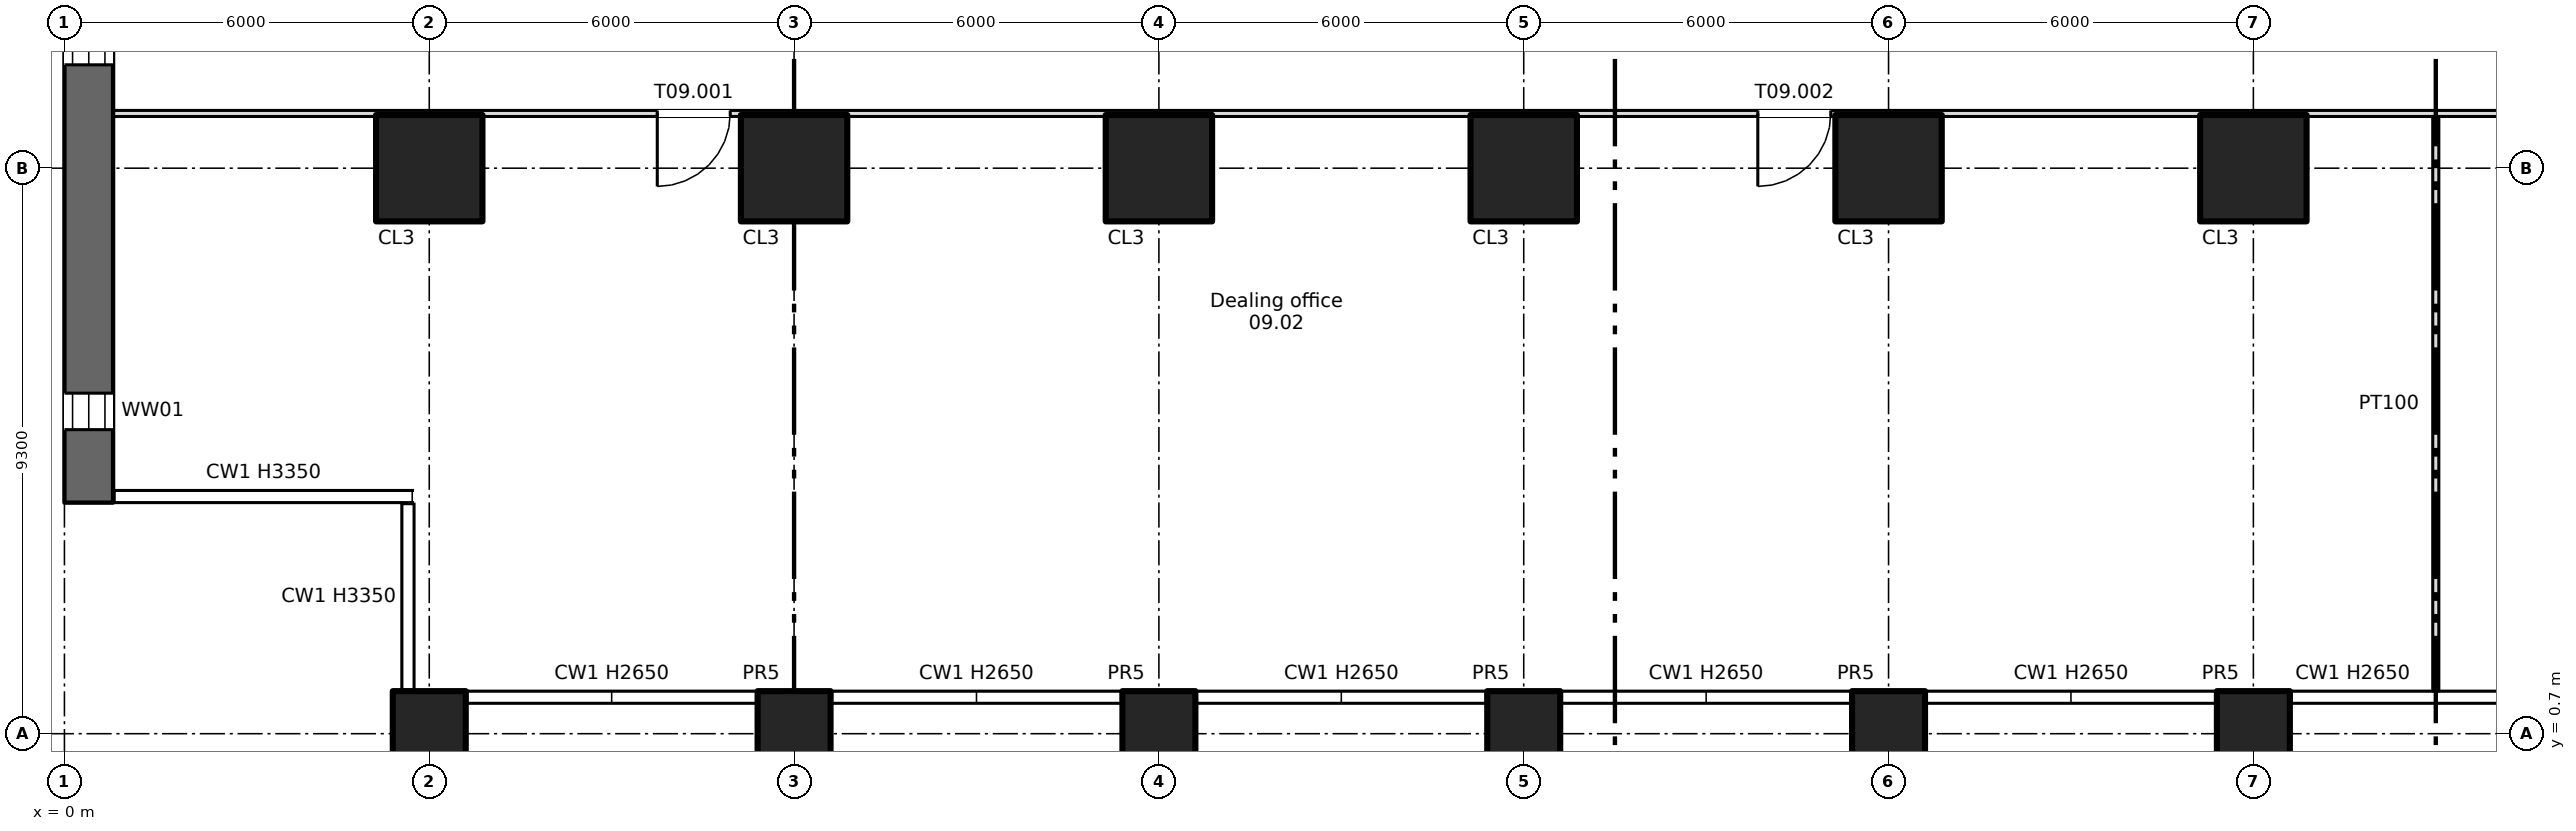
"""IFC4 building model, lengths in metres.
Left out: names, types, materials, properties, quantities, classifications, styles, units other than length and angle.
Written with IfcOpenShell. Run it as: python <this file> out.ifc"""

import sys

from ifc_helpers import new_model, si_unit, direction, frame, frame_2d, origin, origin_2d, place, context, subcontext, project, spatial, rectangle, extrude, element, fill, save


model = new_model("IFC4")
c1 = context("Model", 3, precision=1e-05, world=origin(), true_north=direction((0.0, 1.0)))
c2 = subcontext(c1, "Body", "Model", "MODEL_VIEW")
j1 = project(units=[si_unit("LENGTHUNIT", "METRE"), si_unit("PLANEANGLEUNIT", "RADIAN")], contexts=[c1])
p1 = place(None, origin())
s1 = spatial("IfcSite", under=j1, at=p1, CompositionType="ELEMENT")
p2 = place(p1, origin())
s2 = spatial("IfcBuilding", under=s1, at=p2, CompositionType="ELEMENT")
p3 = place(p2, frame((0.0, 0.0, 37.5)))
s3 = spatial("IfcBuildingStorey", under=s2, at=p3, CompositionType="ELEMENT", Elevation=37.5)
for number, where, z_axis, x_axis in (
    (1, (6.0, 0.7, -0.4), (0.0, 0.0, 1.0), (1.0, 0.0, 0.0)),
    (2, (12.0, 0.7, -0.4), (0.0, 0.0, 1.0), (1.0, 0.0, 0.0)),
    (3, (18.0, 0.7, -0.4), (0.0, 0.0, 1.0), (1.0, 0.0, 0.0)),
    (4, (24.0, 0.7, -0.4), (0.0, 0.0, 1.0), (1.0, 0.0, 0.0)),
    (5, (30.0, 0.7, -0.4), (0.0, 0.0, 1.0), (1.0, 0.0, 0.0)),
    (6, (36.0, 0.7, -0.4), (0.0, 0.0, 1.0), (1.0, 0.0, 0.0)),
):
    element("IfcColumn", number, at=place(p3, frame(where, z_axis=z_axis, x_axis=x_axis)), inside=s3, PredefinedType="COLUMN", context=c2, shape_type="SweptSolid", body=[
        extrude(rectangle(XDim=1.2, YDim=1.4, at=origin_2d()), origin(), (0.0, 0.0, 1.0), 3.75),
    ])
for number, where, z_axis, x_axis in (
    (7, (6.0, 10.0, 0.0), (0.0, 0.0, 1.0), (1.0, 0.0, 0.0)),
    (8, (12.0, 10.0, 0.0), (0.0, 0.0, 1.0), (1.0, 0.0, 0.0)),
    (9, (18.0, 10.0, 0.0), (0.0, 0.0, 1.0), (1.0, 0.0, 0.0)),
    (10, (24.0, 10.0, 0.0), (0.0, 0.0, 1.0), (1.0, 0.0, 0.0)),
    (11, (30.0, 10.0, 0.0), (0.0, 0.0, 1.0), (1.0, 0.0, 0.0)),
    (12, (36.0, 10.0, 0.0), (0.0, 0.0, 1.0), (1.0, 0.0, 0.0)),
):
    element("IfcColumn", number, at=place(p3, frame(where, z_axis=z_axis, x_axis=x_axis)), inside=s3, PredefinedType="COLUMN", context=c2, shape_type="SweptSolid", body=[
        extrude(rectangle(XDim=1.75, YDim=1.75, at=origin_2d()), origin(), (0.0, 0.0, 1.0), 3.35),
    ])
p4 = place(p3, frame((0.4, 4.5, 0.0), z_axis=(0.0, 0.0, 1.0), x_axis=(0.0, 1.0, 0.0)))
e13 = element("IfcWall", 13, at=p4, inside=s3, PredefinedType="SHEAR", context=c2, shape_type="SweptSolid", body=[
    extrude(rectangle(XDim=37.0, YDim=0.8, at=frame_2d((18.5, 0.0))), origin(), (0.0, 0.0, 1.0), 3.35),
])
p5 = place(p4, frame((1.2, 0.0, 0.6)))
e14 = element("IfcOpeningElement", 14, at=p5, cuts=e13, PredefinedType="OPENING", context=c2, shape_type="SweptSolid", body=[
    extrude(rectangle(XDim=0.6, YDim=2.4, at=frame_2d((0.3, 1.2))), frame((0.0, 0.41, 0.0), z_axis=(0.0, -1.0, 0.0), x_axis=(1.0, 0.0, 0.0)), (0.0, 0.0, 1.0), 0.82),
])
p6 = place(p4, frame((7.2, 0.0, 0.6)))
e15 = element("IfcOpeningElement", 15, at=p6, cuts=e13, PredefinedType="OPENING", context=c2, shape_type="SweptSolid", body=[
    extrude(rectangle(XDim=0.6, YDim=2.4, at=frame_2d((0.3, 1.2))), frame((0.0, 0.41, 0.0), z_axis=(0.0, -1.0, 0.0), x_axis=(1.0, 0.0, 0.0)), (0.0, 0.0, 1.0), 0.82),
])
p7 = place(p4, frame((13.2, 0.0, 0.6)))
e16 = element("IfcOpeningElement", 16, at=p7, cuts=e13, PredefinedType="OPENING", context=c2, shape_type="SweptSolid", body=[
    extrude(rectangle(XDim=0.6, YDim=2.4, at=frame_2d((0.3, 1.2))), frame((0.0, 0.41, 0.0), z_axis=(0.0, -1.0, 0.0), x_axis=(1.0, 0.0, 0.0)), (0.0, 0.0, 1.0), 0.82),
])
p8 = place(p4, frame((19.2, 0.0, 0.6)))
e17 = element("IfcOpeningElement", 17, at=p8, cuts=e13, PredefinedType="OPENING", context=c2, shape_type="SweptSolid", body=[
    extrude(rectangle(XDim=0.6, YDim=2.4, at=frame_2d((0.3, 1.2))), frame((0.0, 0.41, 0.0), z_axis=(0.0, -1.0, 0.0), x_axis=(1.0, 0.0, 0.0)), (0.0, 0.0, 1.0), 0.82),
])
p9 = place(p4, frame((25.2, 0.0, 0.6)))
e18 = element("IfcOpeningElement", 18, at=p9, cuts=e13, PredefinedType="OPENING", context=c2, shape_type="SweptSolid", body=[
    extrude(rectangle(XDim=0.6, YDim=2.4, at=frame_2d((0.3, 1.2))), frame((0.0, 0.41, 0.0), z_axis=(0.0, -1.0, 0.0), x_axis=(1.0, 0.0, 0.0)), (0.0, 0.0, 1.0), 0.82),
])
p10 = place(p4, frame((31.2, 0.0, 0.6)))
e19 = element("IfcOpeningElement", 19, at=p10, cuts=e13, PredefinedType="OPENING", context=c2, shape_type="SweptSolid", body=[
    extrude(rectangle(XDim=0.6, YDim=2.4, at=frame_2d((0.3, 1.2))), frame((0.0, 0.41, 0.0), z_axis=(0.0, -1.0, 0.0), x_axis=(1.0, 0.0, 0.0)), (0.0, 0.0, 1.0), 0.82),
])
p11 = place(p3, frame((0.8, 10.9, 0.0), z_axis=(0.0, 0.0, 1.0), x_axis=(1.0, 0.0, 0.0)))
e20 = element("IfcWall", 20, at=p11, inside=s3, PredefinedType="PARTITIONING", context=c2, shape_type="SweptSolid", body=[
    extrude(rectangle(XDim=76.4, YDim=0.1, at=frame_2d((38.2, 0.0))), origin(), (0.0, 0.0, 1.0), 3.35),
])
p12 = place(p11, frame((8.95, 0.0, 0.0)))
e21 = element("IfcOpeningElement", 21, at=p12, cuts=e20, PredefinedType="OPENING", context=c2, shape_type="SweptSolid", body=[
    extrude(rectangle(XDim=1.2, YDim=2.1, at=frame_2d((0.6, 1.05))), frame((0.0, 0.06, 0.0), z_axis=(0.0, -1.0, 0.0), x_axis=(1.0, 0.0, 0.0)), (0.0, 0.0, 1.0), 0.12),
])
p13 = place(p11, frame((27.05, 0.0, 0.0)))
e22 = element("IfcOpeningElement", 22, at=p13, cuts=e20, PredefinedType="OPENING", context=c2, shape_type="SweptSolid", body=[
    extrude(rectangle(XDim=1.2, YDim=2.1, at=frame_2d((0.6, 1.05))), frame((0.0, 0.06, 0.0), z_axis=(0.0, -1.0, 0.0), x_axis=(1.0, 0.0, 0.0)), (0.0, 0.0, 1.0), 0.12),
])
p14 = place(p11, frame((48.15, 0.0, 0.0)))
e23 = element("IfcOpeningElement", 23, at=p14, cuts=e20, PredefinedType="OPENING", context=c2, shape_type="SweptSolid", body=[
    extrude(rectangle(XDim=1.2, YDim=2.1, at=frame_2d((0.6, 1.05))), frame((0.0, 0.06, 0.0), z_axis=(0.0, -1.0, 0.0), x_axis=(1.0, 0.0, 0.0)), (0.0, 0.0, 1.0), 0.12),
])
p15 = place(p11, frame((66.25, 0.0, 0.0)))
e24 = element("IfcOpeningElement", 24, at=p15, cuts=e20, PredefinedType="OPENING", context=c2, shape_type="SweptSolid", body=[
    extrude(rectangle(XDim=1.2, YDim=2.1, at=frame_2d((0.6, 1.05))), frame((0.0, 0.06, 0.0), z_axis=(0.0, -1.0, 0.0), x_axis=(1.0, 0.0, 0.0)), (0.0, 0.0, 1.0), 0.12),
])
p16 = place(p3, frame((39.0, 1.4, 0.0), z_axis=(0.0, 0.0, 1.0), x_axis=(0.0, 1.0, 0.0)))
e25 = element("IfcWall", 25, at=p16, inside=s3, PredefinedType="PARTITIONING", context=c2, shape_type="SweptSolid", body=[
    extrude(rectangle(XDim=9.45, YDim=0.1, at=frame_2d((4.725, 0.0))), origin(), (0.0, 0.0, 1.0), 3.35),
])
p17 = place(p5, origin())
e26 = element("IfcWindow", 26, at=p17, inside=s3, PartitioningType="SINGLE_PANEL", PredefinedType="WINDOW", context=c2, shape_type="SweptSolid", body=[
    extrude(rectangle(XDim=0.6, YDim=2.4, at=frame_2d((0.3, 1.2))), frame((0.0, 0.03, 0.0), z_axis=(0.0, -1.0, 0.0), x_axis=(1.0, 0.0, 0.0)), (0.0, 0.0, 1.0), 0.06),
])
fill(e14, e26)
p18 = place(p6, origin())
e27 = element("IfcWindow", 27, at=p18, inside=s3, PartitioningType="SINGLE_PANEL", PredefinedType="WINDOW", context=c2, shape_type="SweptSolid", body=[
    extrude(rectangle(XDim=0.6, YDim=2.4, at=frame_2d((0.3, 1.2))), frame((0.0, 0.03, 0.0), z_axis=(0.0, -1.0, 0.0), x_axis=(1.0, 0.0, 0.0)), (0.0, 0.0, 1.0), 0.06),
])
fill(e15, e27)
p19 = place(p12, origin())
e28 = element("IfcDoor", 28, at=p19, inside=s3, OperationType="SINGLE_SWING_LEFT", PredefinedType="DOOR", context=c2, shape_type="SweptSolid", body=[
    extrude(rectangle(XDim=1.2, YDim=2.1, at=frame_2d((0.6, 1.05))), frame((0.0, 0.025, 0.0), z_axis=(0.0, -1.0, 0.0), x_axis=(1.0, 0.0, 0.0)), (0.0, 0.0, 1.0), 0.05),
])
fill(e21, e28)
p20 = place(p13, origin())
e29 = element("IfcDoor", 29, at=p20, inside=s3, OperationType="SINGLE_SWING_LEFT", PredefinedType="DOOR", context=c2, shape_type="SweptSolid", body=[
    extrude(rectangle(XDim=1.2, YDim=2.1, at=frame_2d((0.6, 1.05))), frame((0.0, 0.025, 0.0), z_axis=(0.0, -1.0, 0.0), x_axis=(1.0, 0.0, 0.0)), (0.0, 0.0, 1.0), 0.05),
])
fill(e22, e29)
save(model, sys.argv[1])
